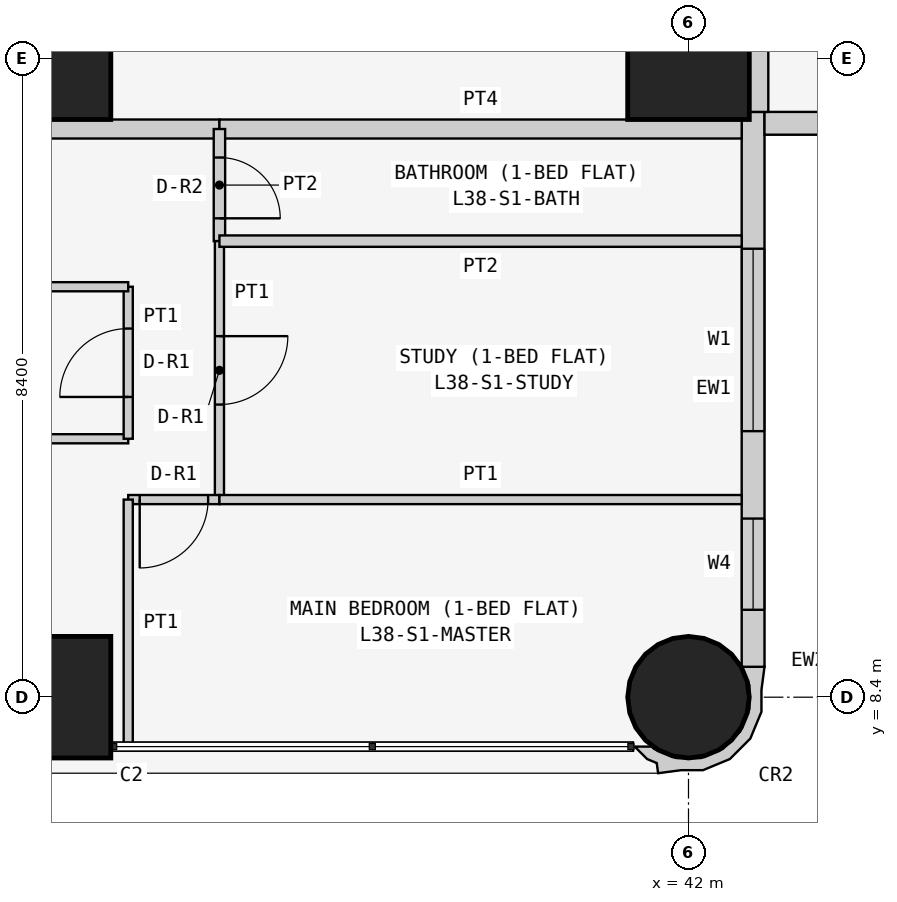
"""IFC4 building model, lengths in metres.
Left out: names, types, materials, properties, quantities, classifications, styles, units other than length and angle.
Written with IfcOpenShell. Run it as: python <this file> out.ifc"""

import sys

from ifc_helpers import new_model, si_unit, direction, frame, frame_2d, origin, origin_2d, place, context, subcontext, project, spatial, polyline, rectangle, circle, outline, extrude, element, fill, save


model = new_model("IFC4")
c1 = context("Model", 3, precision=1e-05, world=origin(), true_north=direction((0.0, 1.0)))
c2 = subcontext(c1, "Body", "Model", "MODEL_VIEW")
j1 = project(units=[si_unit("LENGTHUNIT", "METRE"), si_unit("PLANEANGLEUNIT", "RADIAN")], contexts=[c1])
p1 = place(None, origin())
s1 = spatial("IfcSite", under=j1, at=p1, CompositionType="ELEMENT")
p2 = place(p1, origin())
s2 = spatial("IfcBuilding", under=s1, at=p2, CompositionType="ELEMENT")
p3 = place(p2, frame((0.0, 0.0, 148.5)))
s3 = spatial("IfcBuildingStorey", under=s2, at=p3, CompositionType="ELEMENT", Elevation=148.5)
for number, where, z_axis, x_axis in (
    (1, (33.6, 8.4, 0.0), (0.0, 0.0, 1.0), (1.0, 0.0, 0.0)),
    (2, (33.6, 16.8, 0.0), (0.0, 0.0, 1.0), (1.0, 0.0, 0.0)),
):
    element("IfcColumn", number, at=place(p3, frame(where, z_axis=z_axis, x_axis=x_axis)), inside=s3, PredefinedType="COLUMN", context=c2, shape_type="SweptSolid", body=[
        extrude(rectangle(XDim=1.6, YDim=1.6, at=origin_2d()), origin(), (0.0, 0.0, 1.0), 3.6),
    ])
p4 = place(p3, frame((42.0, 8.4, 0.0), z_axis=(0.0, 0.0, 1.0), x_axis=(1.0, 0.0, 0.0)))
e3 = element("IfcColumn", 3, at=p4, inside=s3, PredefinedType="COLUMN", context=c2, shape_type="SweptSolid", body=[
    extrude(circle(Radius=0.8, at=origin_2d()), origin(), (0.0, 0.0, 1.0), 3.6),
])
p5 = place(p3, frame((42.0, 16.8, 0.0), z_axis=(0.0, 0.0, 1.0), x_axis=(1.0, 0.0, 0.0)))
e4 = element("IfcColumn", 4, at=p5, inside=s3, PredefinedType="COLUMN", context=c2, shape_type="SweptSolid", body=[
    extrude(rectangle(XDim=1.6, YDim=1.6, at=origin_2d()), origin(), (0.0, 0.0, 1.0), 3.6),
])
p6 = place(p3, frame((42.85, 8.8, 0.0), z_axis=(0.0, 0.0, 1.0), x_axis=(0.0, 1.0, 0.0)))
e5 = element("IfcWall", 5, at=p6, inside=s3, PredefinedType="SOLIDWALL", context=c2, shape_type="SweptSolid", body=[
    extrude(rectangle(XDim=7.3, YDim=0.3, at=frame_2d((3.65, 0.0))), origin(), (0.0, 0.0, 1.0), 3.45),
])
p7 = place(p6, frame((3.1, 0.0, 0.9)))
e6 = element("IfcOpeningElement", 6, at=p7, cuts=e5, PredefinedType="OPENING", context=c2, shape_type="SweptSolid", body=[
    extrude(rectangle(XDim=2.4, YDim=1.5, at=frame_2d((1.2, 0.75))), frame((0.0, 0.16, 0.0), z_axis=(0.0, -1.0, 0.0), x_axis=(1.0, 0.0, 0.0)), (0.0, 0.0, 1.0), 0.32),
])
p8 = place(p6, frame((0.75, 0.0, 0.9)))
e7 = element("IfcOpeningElement", 7, at=p8, cuts=e5, PredefinedType="OPENING", context=c2, shape_type="SweptSolid", body=[
    extrude(rectangle(XDim=1.2, YDim=1.5, at=frame_2d((0.6, 0.75))), frame((0.0, 0.16, 0.0), z_axis=(0.0, -1.0, 0.0), x_axis=(1.0, 0.0, 0.0)), (0.0, 0.0, 1.0), 0.32),
])
p9 = place(p3, frame((43.0, 15.95, 0.0), z_axis=(0.0, 0.0, 1.0), x_axis=(1.0, 0.0, 0.0)))
e8 = element("IfcWall", 8, at=p9, inside=s3, PredefinedType="SOLIDWALL", context=c2, shape_type="SweptSolid", body=[
    extrude(rectangle(XDim=15.4, YDim=0.3, at=frame_2d((7.7, 0.0))), origin(), (0.0, 0.0, 1.0), 3.45),
])
p10 = place(p9, frame((1.2, 0.0, 0.9)))
e9 = element("IfcOpeningElement", 9, at=p10, cuts=e8, PredefinedType="OPENING", context=c2, shape_type="SweptSolid", body=[
    extrude(rectangle(XDim=1.8, YDim=1.5, at=frame_2d((0.9, 0.75))), frame((0.0, 0.16, 0.0), z_axis=(0.0, -1.0, 0.0), x_axis=(1.0, 0.0, 0.0)), (0.0, 0.0, 1.0), 0.32),
])
p11 = place(p9, frame((4.95, 0.0, 1.5)))
e10 = element("IfcOpeningElement", 10, at=p11, cuts=e8, PredefinedType="OPENING", context=c2, shape_type="SweptSolid", body=[
    extrude(rectangle(XDim=0.9, YDim=0.7, at=frame_2d((0.45, 0.35))), frame((0.0, 0.16, 0.0), z_axis=(0.0, -1.0, 0.0), x_axis=(1.0, 0.0, 0.0)), (0.0, 0.0, 1.0), 0.32),
])
p12 = place(p9, frame((8.5, 0.0, 0.9)))
e11 = element("IfcOpeningElement", 11, at=p12, cuts=e8, PredefinedType="OPENING", context=c2, shape_type="SweptSolid", body=[
    extrude(rectangle(XDim=1.8, YDim=1.5, at=frame_2d((0.9, 0.75))), frame((0.0, 0.16, 0.0), z_axis=(0.0, -1.0, 0.0), x_axis=(1.0, 0.0, 0.0)), (0.0, 0.0, 1.0), 0.32),
])
p13 = place(p9, frame((12.5, 0.0, 0.0)))
e12 = element("IfcOpeningElement", 12, at=p13, cuts=e8, PredefinedType="OPENING", context=c2, shape_type="SweptSolid", body=[
    extrude(rectangle(XDim=0.9, YDim=2.4, at=frame_2d((0.45, 1.2))), frame((0.0, 0.16, 0.0), z_axis=(0.0, -1.0, 0.0), x_axis=(1.0, 0.0, 0.0)), (0.0, 0.0, 1.0), 0.32),
])
p14 = place(p9, frame((13.5, 0.0, 0.9)))
e13 = element("IfcOpeningElement", 13, at=p14, cuts=e8, PredefinedType="OPENING", context=c2, shape_type="SweptSolid", body=[
    extrude(rectangle(XDim=1.2, YDim=1.5, at=frame_2d((0.6, 0.75))), frame((0.0, 0.16, 0.0), z_axis=(0.0, -1.0, 0.0), x_axis=(1.0, 0.0, 0.0)), (0.0, 0.0, 1.0), 0.32),
])
p15 = place(p3, frame((41.352, 7.805, 0.0), z_axis=(0.0, 0.0, 1.0), x_axis=(0.343276641956, -0.93923434088, 0.0)))
e14 = element("IfcWall", 14, at=p15, inside=s3, PredefinedType="SOLIDWALL", context=c2, shape_type="SweptSolid", body=[
    extrude(outline(polyline([(-0.369, 1.89), (-0.509, 1.621), (-0.49, 1.615), (-0.479, 1.609), (-0.211, 1.62), (0.088, 1.511), (0.323, 1.295), (0.457, 1.006), (0.47, 0.688), (0.361, 0.389), (0.145, 0.154), (0.108, 0.136), (0.031, -0.075), (0.241, 0.023), (0.333, 0.124), (0.465, 0.094), (0.532, 0.393), (0.631, 0.663), (0.614, 1.044), (0.453, 1.391), (0.172, 1.649), (-0.097, 1.748), (-0.369, 1.89)])), origin(), (0.0, 0.0, 1.0), 3.45),
])
p16 = place(p3, frame((42.925, 22.971, 0.0), z_axis=(0.0, 0.0, 1.0), x_axis=(0.0, -1.0, 0.0)))
e15 = element("IfcWall", 15, at=p16, inside=s3, PredefinedType="PARTITIONING", context=c2, shape_type="SweptSolid", body=[
    extrude(rectangle(XDim=6.871, YDim=0.25, at=frame_2d((3.436, 0.0))), origin(), (0.0, 0.0, 1.0), 3.45),
])
p17 = place(p3, frame((35.829, 15.875, 0.0), z_axis=(0.0, 0.0, 1.0), x_axis=(-1.0, 0.0, 0.0)))
e16 = element("IfcWall", 16, at=p17, inside=s3, PredefinedType="PARTITIONING", context=c2, shape_type="SweptSolid", body=[
    extrude(rectangle(XDim=6.429, YDim=0.25, at=frame_2d((3.215, 0.0))), origin(), (0.0, 0.0, 1.0), 3.45),
])
p18 = place(p17, frame((4.929, 0.0, 0.0)))
e17 = element("IfcOpeningElement", 17, at=p18, cuts=e16, PredefinedType="OPENING", context=c2, shape_type="SweptSolid", body=[
    extrude(rectangle(XDim=1.0, YDim=2.1, at=frame_2d((0.5, 1.05))), frame((0.0, 0.135, 0.0), z_axis=(0.0, -1.0, 0.0), x_axis=(1.0, 0.0, 0.0)), (0.0, 0.0, 1.0), 0.27),
])
p19 = place(p3, frame((42.7, 15.875, 0.0), z_axis=(0.0, 0.0, 1.0), x_axis=(-1.0, 0.0, 0.0)))
e18 = element("IfcWall", 18, at=p19, inside=s3, PredefinedType="PARTITIONING", context=c2, shape_type="SweptSolid", body=[
    extrude(rectangle(XDim=6.871, YDim=0.25, at=frame_2d((3.436, 0.0))), origin(), (0.0, 0.0, 1.0), 3.45),
])
p20 = place(p3, frame((29.4, 11.8, 0.0), z_axis=(0.0, 0.0, 1.0), x_axis=(1.0, 0.0, 0.0)))
e19 = element("IfcWall", 19, at=p20, inside=s3, PredefinedType="PARTITIONING", context=c2, shape_type="SweptSolid", body=[
    extrude(rectangle(XDim=5.229, YDim=0.12, at=frame_2d((2.615, 0.0))), origin(), (0.0, 0.0, 1.0), 3.45),
])
p21 = place(p3, frame((34.629, 11.8, 0.0), z_axis=(0.0, 0.0, 1.0), x_axis=(0.0, 1.0, 0.0)))
e20 = element("IfcWall", 20, at=p21, inside=s3, PredefinedType="PARTITIONING", context=c2, shape_type="SweptSolid", body=[
    extrude(rectangle(XDim=2.0, YDim=0.12, at=frame_2d((1.0, 0.0))), origin(), (0.0, 0.0, 1.0), 3.45),
])
p22 = place(p21, frame((0.55, 0.0, 0.0)))
e21 = element("IfcOpeningElement", 21, at=p22, cuts=e20, PredefinedType="OPENING", context=c2, shape_type="SweptSolid", body=[
    extrude(rectangle(XDim=0.9, YDim=2.1, at=frame_2d((0.45, 1.05))), frame((0.0, 0.07, 0.0), z_axis=(0.0, -1.0, 0.0), x_axis=(1.0, 0.0, 0.0)), (0.0, 0.0, 1.0), 0.14),
])
p23 = place(p3, frame((34.629, 13.8, 0.0), z_axis=(0.0, 0.0, 1.0), x_axis=(-1.0, 0.0, 0.0)))
e22 = element("IfcWall", 22, at=p23, inside=s3, PredefinedType="PARTITIONING", context=c2, shape_type="SweptSolid", body=[
    extrude(rectangle(XDim=5.229, YDim=0.12, at=frame_2d((2.615, 0.0))), origin(), (0.0, 0.0, 1.0), 3.45),
])
p24 = place(p3, frame((35.829, 15.875, 0.0), z_axis=(0.0, 0.0, 1.0), x_axis=(0.0, -1.0, 0.0)))
e23 = element("IfcWall", 23, at=p24, inside=s3, PredefinedType="PARTITIONING", context=c2, shape_type="SweptSolid", body=[
    extrude(rectangle(XDim=1.475, YDim=0.15, at=frame_2d((0.738, 0.0))), origin(), (0.0, 0.0, 1.0), 3.45),
])
p25 = place(p24, frame((0.375, 0.0, 0.0)))
e24 = element("IfcOpeningElement", 24, at=p25, cuts=e23, PredefinedType="OPENING", context=c2, shape_type="SweptSolid", body=[
    extrude(rectangle(XDim=0.8, YDim=2.1, at=frame_2d((0.4, 1.05))), frame((0.0, 0.085, 0.0), z_axis=(0.0, -1.0, 0.0), x_axis=(1.0, 0.0, 0.0)), (0.0, 0.0, 1.0), 0.17),
])
p26 = place(p3, frame((35.829, 14.4, 0.0), z_axis=(0.0, 0.0, 1.0), x_axis=(0.0, -1.0, 0.0)))
e25 = element("IfcWall", 25, at=p26, inside=s3, PredefinedType="PARTITIONING", context=c2, shape_type="SweptSolid", body=[
    extrude(rectangle(XDim=3.4, YDim=0.12, at=frame_2d((1.7, 0.0))), origin(), (0.0, 0.0, 1.0), 3.45),
])
p27 = place(p26, frame((1.25, 0.0, 0.0)))
e26 = element("IfcOpeningElement", 26, at=p27, cuts=e25, PredefinedType="OPENING", context=c2, shape_type="SweptSolid", body=[
    extrude(rectangle(XDim=0.9, YDim=2.1, at=frame_2d((0.45, 1.05))), frame((0.0, 0.07, 0.0), z_axis=(0.0, -1.0, 0.0), x_axis=(1.0, 0.0, 0.0)), (0.0, 0.0, 1.0), 0.14),
])
p28 = place(p3, frame((35.829, 11.0, 0.0), z_axis=(0.0, 0.0, 1.0), x_axis=(-1.0, 0.0, 0.0)))
e27 = element("IfcWall", 27, at=p28, inside=s3, PredefinedType="PARTITIONING", context=c2, shape_type="SweptSolid", body=[
    extrude(rectangle(XDim=1.2, YDim=0.12, at=frame_2d((0.6, 0.0))), origin(), (0.0, 0.0, 1.0), 3.45),
])
p29 = place(p28, frame((0.149, 0.0, 0.0)))
e28 = element("IfcOpeningElement", 28, at=p29, cuts=e27, PredefinedType="OPENING", context=c2, shape_type="SweptSolid", body=[
    extrude(rectangle(XDim=0.9, YDim=2.1, at=frame_2d((0.45, 1.05))), frame((0.0, 0.07, 0.0), z_axis=(0.0, -1.0, 0.0), x_axis=(1.0, 0.0, 0.0)), (0.0, 0.0, 1.0), 0.14),
])
p30 = place(p3, frame((34.629, 11.0, 0.0), z_axis=(0.0, 0.0, 1.0), x_axis=(0.0, -1.0, 0.0)))
e29 = element("IfcWall", 29, at=p30, inside=s3, PredefinedType="PARTITIONING", context=c2, shape_type="SweptSolid", body=[
    extrude(rectangle(XDim=3.25, YDim=0.12, at=frame_2d((1.625, 0.0))), origin(), (0.0, 0.0, 1.0), 3.45),
])
p31 = place(p3, frame((35.829, 14.4, 0.0), z_axis=(0.0, 0.0, 1.0), x_axis=(1.0, 0.0, 0.0)))
e30 = element("IfcWall", 30, at=p31, inside=s3, PredefinedType="PARTITIONING", context=c2, shape_type="SweptSolid", body=[
    extrude(rectangle(XDim=6.871, YDim=0.15, at=frame_2d((3.436, 0.0))), origin(), (0.0, 0.0, 1.0), 3.45),
])
p32 = place(p3, frame((35.829, 11.0, 0.0), z_axis=(0.0, 0.0, 1.0), x_axis=(1.0, 0.0, 0.0)))
e31 = element("IfcWall", 31, at=p32, inside=s3, PredefinedType="PARTITIONING", context=c2, shape_type="SweptSolid", body=[
    extrude(rectangle(XDim=6.871, YDim=0.12, at=frame_2d((3.436, 0.0))), origin(), (0.0, 0.0, 1.0), 3.45),
])
p33 = place(p7, origin())
e32 = element("IfcWindow", 32, at=p33, inside=s3, PartitioningType="SINGLE_PANEL", PredefinedType="WINDOW", context=c2, shape_type="SweptSolid", body=[
    extrude(rectangle(XDim=2.4, YDim=1.5, at=frame_2d((1.2, 0.75))), frame((0.0, 0.03, 0.0), z_axis=(0.0, -1.0, 0.0), x_axis=(1.0, 0.0, 0.0)), (0.0, 0.0, 1.0), 0.06),
])
fill(e6, e32)
p34 = place(p8, origin())
e33 = element("IfcWindow", 33, at=p34, inside=s3, PartitioningType="SINGLE_PANEL", PredefinedType="WINDOW", context=c2, shape_type="SweptSolid", body=[
    extrude(rectangle(XDim=1.2, YDim=1.5, at=frame_2d((0.6, 0.75))), frame((0.0, 0.03, 0.0), z_axis=(0.0, -1.0, 0.0), x_axis=(1.0, 0.0, 0.0)), (0.0, 0.0, 1.0), 0.06),
])
fill(e7, e33)
p35 = place(p22, origin())
e34 = element("IfcDoor", 34, at=p35, inside=s3, OperationType="SINGLE_SWING_LEFT", PredefinedType="DOOR", context=c2, shape_type="SweptSolid", body=[
    extrude(rectangle(XDim=0.9, YDim=2.1, at=frame_2d((0.45, 1.05))), frame((0.0, 0.025, 0.0), z_axis=(0.0, -1.0, 0.0), x_axis=(1.0, 0.0, 0.0)), (0.0, 0.0, 1.0), 0.05),
])
fill(e21, e34)
p36 = place(p25, origin())
e35 = element("IfcDoor", 35, at=p36, inside=s3, OperationType="SINGLE_SWING_RIGHT", PredefinedType="DOOR", context=c2, shape_type="SweptSolid", body=[
    extrude(rectangle(XDim=0.8, YDim=2.1, at=frame_2d((0.4, 1.05))), frame((0.0, 0.025, 0.0), z_axis=(0.0, -1.0, 0.0), x_axis=(1.0, 0.0, 0.0)), (0.0, 0.0, 1.0), 0.05),
])
fill(e24, e35)
p37 = place(p27, origin())
e36 = element("IfcDoor", 36, at=p37, inside=s3, OperationType="SINGLE_SWING_LEFT", PredefinedType="DOOR", context=c2, shape_type="SweptSolid", body=[
    extrude(rectangle(XDim=0.9, YDim=2.1, at=frame_2d((0.45, 1.05))), frame((0.0, 0.025, 0.0), z_axis=(0.0, -1.0, 0.0), x_axis=(1.0, 0.0, 0.0)), (0.0, 0.0, 1.0), 0.05),
])
fill(e26, e36)
p38 = place(p29, origin())
e37 = element("IfcDoor", 37, at=p38, inside=s3, OperationType="SINGLE_SWING_RIGHT", PredefinedType="DOOR", context=c2, shape_type="SweptSolid", body=[
    extrude(rectangle(XDim=0.9, YDim=2.1, at=frame_2d((0.45, 1.05))), frame((0.0, 0.025, 0.0), z_axis=(0.0, -1.0, 0.0), x_axis=(1.0, 0.0, 0.0)), (0.0, 0.0, 1.0), 0.05),
])
fill(e28, e37)
save(model, sys.argv[1])
